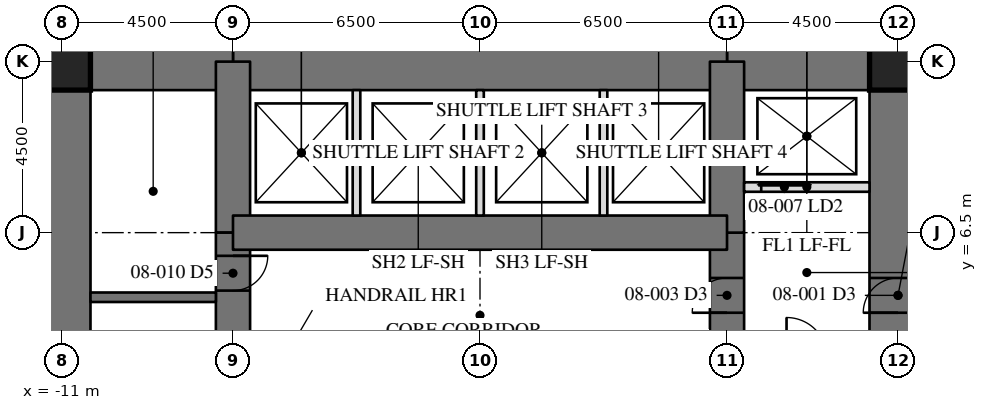
"""IFC4 building model, lengths in metres.
Left out: names, types, materials, properties, quantities, classifications, styles, units other than length and angle.
Written with IfcOpenShell. Run it as: python <this file> out.ifc"""

import sys

from ifc_helpers import new_model, si_unit, direction, frame, frame_2d, origin, origin_2d, place, context, subcontext, project, spatial, rectangle, hollow_rectangle, extrude, element, fill, save


model = new_model("IFC4")
c1 = context("Model", 3, precision=1e-05, world=origin(), true_north=direction((0.0, 1.0)))
c2 = subcontext(c1, "Body", "Model", "MODEL_VIEW")
j1 = project(units=[si_unit("LENGTHUNIT", "METRE"), si_unit("PLANEANGLEUNIT", "RADIAN")], contexts=[c1])
p1 = place(None, origin())
s1 = spatial("IfcSite", under=j1, at=p1, CompositionType="ELEMENT")
p2 = place(p1, origin())
s2 = spatial("IfcBuilding", under=s1, at=p2, CompositionType="ELEMENT")
p3 = place(p2, frame((0.0, 0.0, 36.5)))
s3 = spatial("IfcBuildingStorey", under=s2, at=p3, CompositionType="ELEMENT", Elevation=36.5)
p4 = place(p3, frame((11.0, -11.0, 0.0), z_axis=(0.0, 0.0, 1.0), x_axis=(0.0, 1.0, 0.0)))
e1 = element("IfcWall", 1, at=p4, inside=s3, PredefinedType="SHEAR", context=c2, shape_type="SweptSolid", body=[
    extrude(rectangle(XDim=22.0, YDim=1.5, at=frame_2d((11.0, 0.0))), origin(), (0.0, 0.0, 1.0), 4.1),
])
p5 = place(p4, frame((15.393, 0.0, 0.0)))
e2 = element("IfcOpeningElement", 2, at=p5, cuts=e1, PredefinedType="OPENING", context=c2, shape_type="SweptSolid", body=[
    extrude(rectangle(XDim=0.915, YDim=2.134, at=frame_2d((0.458, 1.067))), frame((0.0, 0.76, 0.0), z_axis=(0.0, -1.0, 0.0), x_axis=(1.0, 0.0, 0.0)), (0.0, 0.0, 1.0), 1.52),
])
p6 = place(p3, frame((-11.0, 11.0, 0.0), z_axis=(0.0, 0.0, 1.0), x_axis=(0.0, -1.0, 0.0)))
e3 = element("IfcWall", 3, at=p6, inside=s3, PredefinedType="SHEAR", context=c2, shape_type="SweptSolid", body=[
    extrude(rectangle(XDim=22.0, YDim=1.5, at=frame_2d((11.0, 0.0))), origin(), (0.0, 0.0, 1.0), 4.1),
])
p7 = place(p6, frame((15.393, 0.0, 0.0)))
e4 = element("IfcOpeningElement", 4, at=p7, cuts=e3, PredefinedType="OPENING", context=c2, shape_type="SweptSolid", body=[
    extrude(rectangle(XDim=0.915, YDim=2.134, at=frame_2d((0.458, 1.067))), frame((0.0, 0.76, 0.0), z_axis=(0.0, -1.0, 0.0), x_axis=(1.0, 0.0, 0.0)), (0.0, 0.0, 1.0), 1.52),
])
p8 = place(p3, frame((11.0, 11.0, 0.0), z_axis=(0.0, 0.0, 1.0), x_axis=(-1.0, 0.0, 0.0)))
e5 = element("IfcWall", 5, at=p8, inside=s3, PredefinedType="SHEAR", context=c2, shape_type="SweptSolid", body=[
    extrude(rectangle(XDim=4.5, YDim=1.5, at=frame_2d((2.25, 0.0))), origin(), (0.0, 0.0, 1.0), 4.1),
])
p9 = place(p3, frame((6.5, 11.0, 0.0), z_axis=(0.0, 0.0, 1.0), x_axis=(-1.0, 0.0, 0.0)))
e6 = element("IfcWall", 6, at=p9, inside=s3, PredefinedType="SHEAR", context=c2, shape_type="SweptSolid", body=[
    extrude(rectangle(XDim=13.0, YDim=1.5, at=frame_2d((6.5, 0.0))), origin(), (0.0, 0.0, 1.0), 4.1),
])
p10 = place(p3, frame((-6.5, 11.0, 0.0), z_axis=(0.0, 0.0, 1.0), x_axis=(-1.0, 0.0, 0.0)))
e7 = element("IfcWall", 7, at=p10, inside=s3, PredefinedType="SHEAR", context=c2, shape_type="SweptSolid", body=[
    extrude(rectangle(XDim=4.5, YDim=1.5, at=frame_2d((2.25, 0.0))), origin(), (0.0, 0.0, 1.0), 4.1),
])
p11 = place(p3, frame((6.5, -6.5, 0.0), z_axis=(0.0, 0.0, 1.0), x_axis=(0.0, 1.0, 0.0)))
e8 = element("IfcWall", 8, at=p11, inside=s3, PredefinedType="SHEAR", context=c2, shape_type="SweptSolid", body=[
    extrude(rectangle(XDim=13.0, YDim=0.9, at=frame_2d((6.5, 0.0))), origin(), (0.0, 0.0, 1.0), 4.1),
])
p12 = place(p11, frame((10.893, 0.0, 0.0)))
e9 = element("IfcOpeningElement", 9, at=p12, cuts=e8, PredefinedType="OPENING", context=c2, shape_type="SweptSolid", body=[
    extrude(rectangle(XDim=0.915, YDim=2.134, at=frame_2d((0.458, 1.067))), frame((0.0, 0.46, 0.0), z_axis=(0.0, -1.0, 0.0), x_axis=(1.0, 0.0, 0.0)), (0.0, 0.0, 1.0), 0.92),
])
p13 = place(p11, frame((0.61, 0.0, 0.0)))
e10 = element("IfcOpeningElement", 10, at=p13, cuts=e8, PredefinedType="OPENING", context=c2, shape_type="SweptSolid", body=[
    extrude(rectangle(XDim=0.915, YDim=2.134, at=frame_2d((0.458, 1.067))), frame((0.0, 0.46, 0.0), z_axis=(0.0, -1.0, 0.0), x_axis=(1.0, 0.0, 0.0)), (0.0, 0.0, 1.0), 0.92),
])
for number, where, z_axis, x_axis in (
    (11, (6.5, 6.5, 0.0), (0.0, 0.0, 1.0), (0.0, 1.0, 0.0)),
    (12, (-6.5, 11.0, 0.0), (0.0, 0.0, 1.0), (0.0, -1.0, 0.0)),
):
    element("IfcWall", number, at=place(p3, frame(where, z_axis=z_axis, x_axis=x_axis)), inside=s3, PredefinedType="SHEAR", context=c2, shape_type="SweptSolid", body=[
        extrude(rectangle(XDim=4.5, YDim=0.9, at=frame_2d((2.25, 0.0))), origin(), (0.0, 0.0, 1.0), 4.1),
    ])
p14 = place(p3, frame((-6.5, 6.5, 0.0), z_axis=(0.0, 0.0, 1.0), x_axis=(0.0, -1.0, 0.0)))
e13 = element("IfcWall", 13, at=p14, inside=s3, PredefinedType="SHEAR", context=c2, shape_type="SweptSolid", body=[
    extrude(rectangle(XDim=13.0, YDim=0.9, at=frame_2d((6.5, 0.0))), origin(), (0.0, 0.0, 1.0), 4.1),
])
p15 = place(p14, frame((10.893, 0.0, 0.0)))
e14 = element("IfcOpeningElement", 14, at=p15, cuts=e13, PredefinedType="OPENING", context=c2, shape_type="SweptSolid", body=[
    extrude(rectangle(XDim=0.915, YDim=2.134, at=frame_2d((0.458, 1.067))), frame((0.0, 0.46, 0.0), z_axis=(0.0, -1.0, 0.0), x_axis=(1.0, 0.0, 0.0)), (0.0, 0.0, 1.0), 0.92),
])
p16 = place(p14, frame((0.61, 0.0, 0.0)))
e15 = element("IfcOpeningElement", 15, at=p16, cuts=e13, PredefinedType="OPENING", context=c2, shape_type="SweptSolid", body=[
    extrude(rectangle(XDim=0.915, YDim=2.134, at=frame_2d((0.458, 1.067))), frame((0.0, 0.46, 0.0), z_axis=(0.0, -1.0, 0.0), x_axis=(1.0, 0.0, 0.0)), (0.0, 0.0, 1.0), 0.92),
])
p17 = place(p3, frame((6.5, 6.5, 0.0), z_axis=(0.0, 0.0, 1.0), x_axis=(-1.0, 0.0, 0.0)))
e16 = element("IfcWall", 16, at=p17, inside=s3, PredefinedType="SHEAR", context=c2, shape_type="SweptSolid", body=[
    extrude(rectangle(XDim=13.0, YDim=0.9, at=frame_2d((6.5, 0.0))), origin(), (0.0, 0.0, 1.0), 4.1),
])
for number, where, z_axis, x_axis in (
    (17, (11.0, 11.0, 0.0), (0.0, 0.0, 1.0), (1.0, 0.0, 0.0)),
    (18, (-11.0, 11.0, 0.0), (0.0, 0.0, 1.0), (1.0, 0.0, 0.0)),
):
    element("IfcColumn", number, at=place(p3, frame(where, z_axis=z_axis, x_axis=x_axis)), inside=s3, PredefinedType="COLUMN", context=c2, shape_type="SweptSolid", body=[
        extrude(hollow_rectangle(XDim=1.499, YDim=1.499, WallThickness=0.102, at=origin_2d()), origin(), (0.0, 0.0, 1.0), 4.1),
    ])
p18 = place(p3, frame((-6.95, 4.8, 0.0), z_axis=(0.0, 0.0, 1.0), x_axis=(-1.0, 0.0, 0.0)))
e19 = element("IfcWall", 19, at=p18, inside=s3, PredefinedType="SOLIDWALL", context=c2, shape_type="SweptSolid", body=[
    extrude(rectangle(XDim=3.3, YDim=0.25, at=frame_2d((1.65, 0.0))), origin(), (0.0, 0.0, 1.0), 3.91),
])
p19 = place(p3, frame((6.95, 7.7, 0.0), z_axis=(0.0, 0.0, 1.0), x_axis=(1.0, 0.0, 0.0)))
e20 = element("IfcWall", 20, at=p19, inside=s3, PredefinedType="PARTITIONING", context=c2, shape_type="SweptSolid", body=[
    extrude(rectangle(XDim=3.3, YDim=0.25, at=frame_2d((1.65, 0.0))), origin(), (0.0, 0.0, 1.0), 3.91),
])
p20 = place(p19, frame((0.45, 0.0, 0.0)))
e21 = element("IfcOpeningElement", 21, at=p20, cuts=e20, PredefinedType="OPENING", context=c2, shape_type="SweptSolid", body=[
    extrude(rectangle(XDim=1.219, YDim=2.134, at=frame_2d((0.609, 1.067))), frame((0.0, 0.135, 0.0), z_axis=(0.0, -1.0, 0.0), x_axis=(1.0, 0.0, 0.0)), (0.0, 0.0, 1.0), 0.27),
])
for number, where, z_axis, x_axis in (
    (22, (-3.25, 6.95, 0.0), (0.0, 0.0, 1.0), (0.0, 1.0, 0.0)),
    (23, (0.0, 6.95, 0.0), (0.0, 0.0, 1.0), (0.0, 1.0, 0.0)),
    (24, (3.25, 6.95, 0.0), (0.0, 0.0, 1.0), (0.0, 1.0, 0.0)),
):
    element("IfcWall", number, at=place(p3, frame(where, z_axis=z_axis, x_axis=x_axis)), inside=s3, PredefinedType="PARTITIONING", context=c2, shape_type="SweptSolid", body=[
        extrude(rectangle(XDim=3.3, YDim=0.2, at=frame_2d((1.65, 0.0))), origin(), (0.0, 0.0, 1.0), 3.91),
    ])
p21 = place(p12, origin())
e25 = element("IfcDoor", 25, at=p21, inside=s3, OperationType="SINGLE_SWING_RIGHT", PredefinedType="DOOR", context=c2, shape_type="SweptSolid", body=[
    extrude(rectangle(XDim=0.915, YDim=2.134, at=frame_2d((0.458, 1.067))), frame((0.0, -0.375, 0.0), z_axis=(0.0, -1.0, 0.0), x_axis=(1.0, 0.0, 0.0)), (0.0, 0.0, 1.0), 0.05),
])
fill(e9, e25)
p22 = place(p20, origin())
e26 = element("IfcDoor", 26, at=p22, inside=s3, OperationType="SLIDING_TO_LEFT", PredefinedType="DOOR", context=c2, shape_type="SweptSolid", body=[
    extrude(rectangle(XDim=1.219, YDim=2.134, at=frame_2d((0.609, 1.067))), frame((0.0, 0.025, 0.0), z_axis=(0.0, -1.0, 0.0), x_axis=(1.0, 0.0, 0.0)), (0.0, 0.0, 1.0), 0.05),
])
fill(e21, e26)
p23 = place(p16, origin())
e27 = element("IfcDoor", 27, at=p23, inside=s3, OperationType="SINGLE_SWING_RIGHT", PredefinedType="DOOR", context=c2, shape_type="SweptSolid", body=[
    extrude(rectangle(XDim=0.915, YDim=2.134, at=frame_2d((0.458, 1.067))), frame((0.0, -0.375, 0.0), z_axis=(0.0, -1.0, 0.0), x_axis=(1.0, 0.0, 0.0)), (0.0, 0.0, 1.0), 0.05),
])
fill(e15, e27)
save(model, sys.argv[1])
